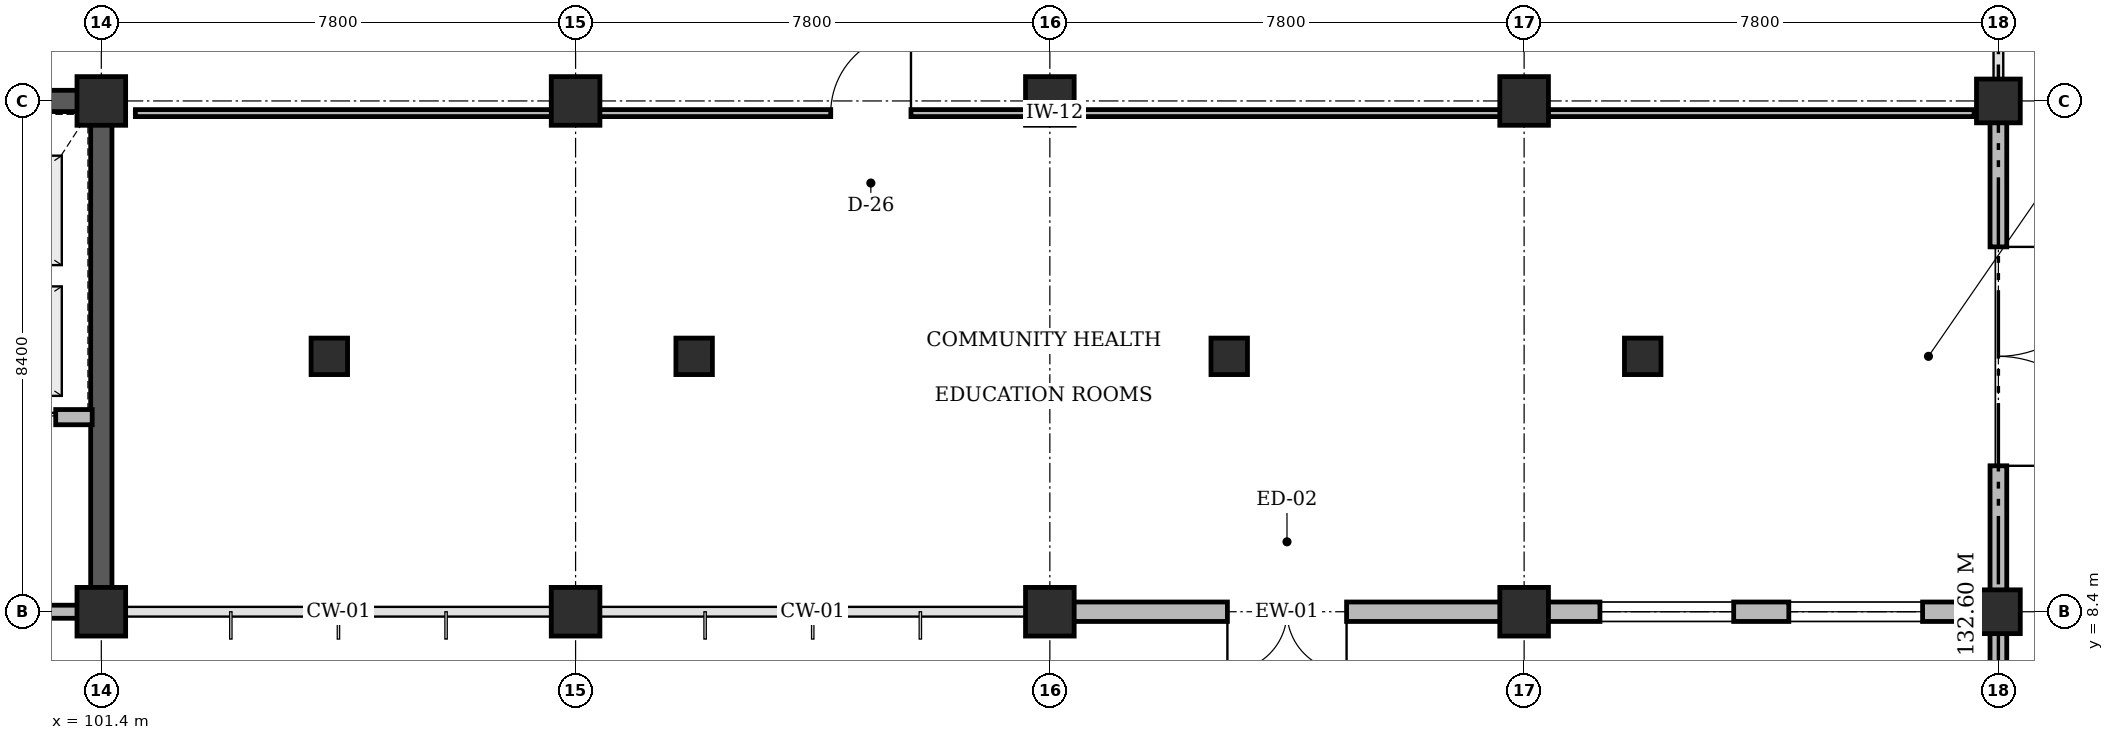
"""IFC4 building model, lengths in metres.
Left out: names, types, materials, properties, quantities, classifications, styles, units other than length and angle.
Written with IfcOpenShell. Run it as: python <this file> out.ifc"""

import sys

from ifc_helpers import new_model, si_unit, direction, frame, frame_2d, origin, origin_2d, place, context, subcontext, project, spatial, rectangle, circle, extrude, element, fill, save


model = new_model("IFC4")
c1 = context("Model", 3, precision=1e-05, world=origin(), true_north=direction((0.0, 1.0)))
c2 = subcontext(c1, "Body", "Model", "MODEL_VIEW")
j1 = project(units=[si_unit("LENGTHUNIT", "METRE"), si_unit("PLANEANGLEUNIT", "RADIAN")], contexts=[c1])
p1 = place(None, origin())
s1 = spatial("IfcSite", under=j1, at=p1, CompositionType="ELEMENT")
p2 = place(p1, origin())
s2 = spatial("IfcBuilding", under=s1, at=p2, CompositionType="ELEMENT")
p3 = place(p2, origin())
s3 = spatial("IfcBuildingStorey", under=s2, at=p3, CompositionType="ELEMENT", Elevation=0.0)
p4 = place(p3, frame((93.425, 16.8, 0.0), z_axis=(0.0, 0.0, 1.0), x_axis=(1.0, 0.0, 0.0)))
e1 = element("IfcWall", 1, at=p4, inside=s3, PredefinedType="SHEAR", context=c2, shape_type="SweptSolid", body=[
    extrude(rectangle(XDim=8.15, YDim=0.35, at=frame_2d((4.075, 0.0))), origin(), (0.0, 0.0, 1.0), 4.48),
])
p5 = place(p3, frame((101.4, 8.4, 0.0), z_axis=(0.0, 0.0, 1.0), x_axis=(0.0, 1.0, 0.0)))
e2 = element("IfcWall", 2, at=p5, inside=s3, PredefinedType="SHEAR", context=c2, shape_type="SweptSolid", body=[
    extrude(rectangle(XDim=8.4, YDim=0.35, at=frame_2d((4.2, 0.0))), origin(), (0.0, 0.0, 1.0), 4.48),
])
for number, where, z_axis, x_axis in (
    (3, (101.4, 8.4, 0.0), (0.0, 0.0, 1.0), (1.0, 0.0, 0.0)),
    (4, (101.4, 16.8, 0.0), (0.0, 0.0, 1.0), (1.0, 0.0, 0.0)),
    (5, (109.2, 8.4, 0.0), (0.0, 0.0, 1.0), (1.0, 0.0, 0.0)),
    (6, (109.2, 16.8, 0.0), (0.0, 0.0, 1.0), (1.0, 0.0, 0.0)),
    (7, (117.0, 8.4, 0.0), (0.0, 0.0, 1.0), (1.0, 0.0, 0.0)),
    (8, (117.0, 16.8, 0.0), (0.0, 0.0, 1.0), (1.0, 0.0, 0.0)),
    (9, (124.8, 8.4, 0.0), (0.0, 0.0, 1.0), (1.0, 0.0, 0.0)),
    (10, (124.8, 16.8, 0.0), (0.0, 0.0, 1.0), (1.0, 0.0, 0.0)),
):
    element("IfcColumn", number, at=place(p3, frame(where, z_axis=z_axis, x_axis=x_axis)), inside=s3, PredefinedType="COLUMN", context=c2, shape_type="SweptSolid", body=[
        extrude(rectangle(XDim=0.8, YDim=0.8, at=origin_2d()), origin(), (0.0, 0.0, 1.0), 4.8),
    ])
for number, where, z_axis, x_axis in (
    (11, (132.6, 8.4, 0.0), (0.0, 0.0, 1.0), (1.0, 0.0, 0.0)),
    (12, (132.6, 16.8, 0.0), (0.0, 0.0, 1.0), (1.0, 0.0, 0.0)),
):
    element("IfcColumn", number, at=place(p3, frame(where, z_axis=z_axis, x_axis=x_axis)), inside=s3, PredefinedType="COLUMN", context=c2, shape_type="SweptSolid", body=[
        extrude(rectangle(XDim=0.72, YDim=0.72, at=origin_2d()), origin(), (0.0, 0.0, 1.0), 4.8),
    ])
for number, where, z_axis, x_axis in (
    (13, (126.75, 12.6, 0.0), (0.0, 0.0, 1.0), (1.0, 0.0, 0.0)),
    (14, (119.95, 12.6, 0.0), (0.0, 0.0, 1.0), (1.0, 0.0, 0.0)),
    (15, (111.15, 12.6, 0.0), (0.0, 0.0, 1.0), (1.0, 0.0, 0.0)),
    (16, (105.15, 12.6, 0.0), (0.0, 0.0, 1.0), (1.0, 0.0, 0.0)),
):
    element("IfcColumn", number, at=place(p3, frame(where, z_axis=z_axis, x_axis=x_axis)), inside=s3, PredefinedType="PILASTER", context=c2, shape_type="SweptSolid", body=[
        extrude(circle(Radius=0.3, at=origin_2d()), origin(), (0.0, 0.0, 1.0), 4.8),
    ])
p6 = place(p3, frame((124.46, 8.4, 0.0), z_axis=(0.0, 0.0, 1.0), x_axis=(-1.0, 0.0, 0.0)))
e17 = element("IfcWall", 17, at=p6, inside=s3, PredefinedType="STANDARD", context=c2, shape_type="SweptSolid", body=[
    extrude(rectangle(XDim=7.12, YDim=0.32, at=frame_2d((3.56, 0.0))), origin(), (0.0, 0.0, 1.0), 3.63),
])
p7 = place(p6, frame((2.58, 0.0, 0.0)))
e18 = element("IfcOpeningElement", 18, at=p7, cuts=e17, PredefinedType="OPENING", context=c2, shape_type="SweptSolid", body=[
    extrude(rectangle(XDim=1.96, YDim=2.2, at=frame_2d((0.98, 1.1))), frame((0.0, 0.17, 0.0), z_axis=(0.0, -1.0, 0.0), x_axis=(1.0, 0.0, 0.0)), (0.0, 0.0, 1.0), 0.34),
])
p8 = place(p3, frame((132.26, 8.4, 0.0), z_axis=(0.0, 0.0, 1.0), x_axis=(-1.0, 0.0, 0.0)))
e19 = element("IfcWall", 19, at=p8, inside=s3, PredefinedType="STANDARD", context=c2, shape_type="SweptSolid", body=[
    extrude(rectangle(XDim=7.12, YDim=0.32, at=frame_2d((3.56, 0.0))), origin(), (0.0, 0.0, 1.0), 3.63),
])
p9 = place(p8, frame((0.907, 0.0, 0.9)))
e20 = element("IfcOpeningElement", 20, at=p9, cuts=e19, PredefinedType="OPENING", context=c2, shape_type="SweptSolid", body=[
    extrude(rectangle(XDim=2.2, YDim=1.65, at=frame_2d((1.1, 0.825))), frame((0.0, 0.17, 0.0), z_axis=(0.0, -1.0, 0.0), x_axis=(1.0, 0.0, 0.0)), (0.0, 0.0, 1.0), 0.34),
])
p10 = place(p8, frame((4.013, 0.0, 0.9)))
e21 = element("IfcOpeningElement", 21, at=p10, cuts=e19, PredefinedType="OPENING", context=c2, shape_type="SweptSolid", body=[
    extrude(rectangle(XDim=2.2, YDim=1.65, at=frame_2d((1.1, 0.825))), frame((0.0, 0.17, 0.0), z_axis=(0.0, -1.0, 0.0), x_axis=(1.0, 0.0, 0.0)), (0.0, 0.0, 1.0), 0.34),
])
p11 = place(p3, frame((132.6, 8.06, 0.0), z_axis=(0.0, 0.0, 1.0), x_axis=(0.0, -1.0, 0.0)))
e22 = element("IfcWall", 22, at=p11, inside=s3, PredefinedType="STANDARD", context=c2, shape_type="SweptSolid", body=[
    extrude(rectangle(XDim=7.72, YDim=0.275, at=frame_2d((3.86, 0.0))), origin(), (0.0, 0.0, 1.0), 3.615),
])
p12 = place(p11, frame((1.373, 0.0, 0.9)))
e23 = element("IfcOpeningElement", 23, at=p12, cuts=e22, PredefinedType="OPENING", context=c2, shape_type="SweptSolid", body=[
    extrude(rectangle(XDim=1.8, YDim=1.65, at=frame_2d((0.9, 0.825))), frame((0.0, 0.147, 0.0), z_axis=(0.0, -1.0, 0.0), x_axis=(1.0, 0.0, 0.0)), (0.0, 0.0, 1.0), 0.295),
])
p13 = place(p11, frame((4.547, 0.0, 0.9)))
e24 = element("IfcOpeningElement", 24, at=p13, cuts=e22, PredefinedType="OPENING", context=c2, shape_type="SweptSolid", body=[
    extrude(rectangle(XDim=1.8, YDim=1.65, at=frame_2d((0.9, 0.825))), frame((0.0, 0.147, 0.0), z_axis=(0.0, -1.0, 0.0), x_axis=(1.0, 0.0, 0.0)), (0.0, 0.0, 1.0), 0.295),
])
p14 = place(p3, frame((132.6, 16.46, 0.0), z_axis=(0.0, 0.0, 1.0), x_axis=(0.0, -1.0, 0.0)))
e25 = element("IfcWall", 25, at=p14, inside=s3, PredefinedType="STANDARD", context=c2, shape_type="SweptSolid", body=[
    extrude(rectangle(XDim=7.72, YDim=0.275, at=frame_2d((3.86, 0.0))), origin(), (0.0, 0.0, 1.0), 3.615),
])
p15 = place(p14, frame((2.06, 0.0, 0.0)))
e26 = element("IfcOpeningElement", 26, at=p15, cuts=e25, PredefinedType="OPENING", context=c2, shape_type="SweptSolid", body=[
    extrude(rectangle(XDim=3.6, YDim=2.8, at=frame_2d((1.8, 1.4))), frame((0.0, 0.147, 0.0), z_axis=(0.0, -1.0, 0.0), x_axis=(1.0, 0.0, 0.0)), (0.0, 0.0, 1.0), 0.295),
])
p16 = place(p3, frame((97.75, 8.4, 0.0), z_axis=(0.0, 0.0, 1.0), x_axis=(1.0, 0.0, 0.0)))
e27 = element("IfcWall", 27, at=p16, inside=s3, PredefinedType="STANDARD", context=c2, shape_type="SweptSolid", body=[
    extrude(rectangle(XDim=3.29, YDim=0.215, at=frame_2d((1.645, 0.0))), origin(), (0.0, 0.0, 1.0), 3.63),
])
p17 = place(p16, frame((0.865, 0.0, 0.0)))
e28 = element("IfcOpeningElement", 28, at=p17, cuts=e27, PredefinedType="OPENING", context=c2, shape_type="SweptSolid", body=[
    extrude(rectangle(XDim=1.56, YDim=2.2, at=frame_2d((0.78, 1.1))), frame((0.0, 0.118, 0.0), z_axis=(0.0, -1.0, 0.0), x_axis=(1.0, 0.0, 0.0)), (0.0, 0.0, 1.0), 0.235),
])
p18 = place(p3, frame((97.75, 11.6, 0.0), z_axis=(0.0, 0.0, 1.0), x_axis=(1.0, 0.0, 0.0)))
e29 = element("IfcWall", 29, at=p18, inside=s3, PredefinedType="STANDARD", context=c2, shape_type="SweptSolid", body=[
    extrude(rectangle(XDim=3.5, YDim=0.25, at=frame_2d((1.75, 0.0))), origin(), (0.0, 0.0, 1.0), 4.46),
])
p19 = place(p18, frame((0.35, 0.0, 0.0)))
e30 = element("IfcOpeningElement", 30, at=p19, cuts=e29, PredefinedType="OPENING", context=c2, shape_type="SweptSolid", body=[
    extrude(rectangle(XDim=1.1, YDim=2.2, at=frame_2d((0.55, 1.1))), frame((0.0, 0.135, 0.0), z_axis=(0.0, -1.0, 0.0), x_axis=(1.0, 0.0, 0.0)), (0.0, 0.0, 1.0), 0.27),
])
p20 = place(p18, frame((1.8, 0.0, 0.0)))
e31 = element("IfcOpeningElement", 31, at=p20, cuts=e29, PredefinedType="OPENING", context=c2, shape_type="SweptSolid", body=[
    extrude(rectangle(XDim=1.1, YDim=2.2, at=frame_2d((0.55, 1.1))), frame((0.0, 0.135, 0.0), z_axis=(0.0, -1.0, 0.0), x_axis=(1.0, 0.0, 0.0)), (0.0, 0.0, 1.0), 0.27),
])
p21 = place(p3, frame((101.96, 16.6, 0.0), z_axis=(0.0, 0.0, 1.0), x_axis=(1.0, 0.0, 0.0)))
e32 = element("IfcWall", 32, at=p21, inside=s3, PredefinedType="PARTITIONING", context=c2, shape_type="SweptSolid", body=[
    extrude(rectangle(XDim=30.24, YDim=0.115, at=frame_2d((15.12, 0.0))), origin(), (0.0, 0.0, 1.0), 3.63),
])
p22 = place(p21, frame((11.436, 0.0, 0.0)))
e33 = element("IfcOpeningElement", 33, at=p22, cuts=e32, PredefinedType="OPENING", context=c2, shape_type="SweptSolid", body=[
    extrude(rectangle(XDim=1.32, YDim=2.15, at=frame_2d((0.66, 1.075))), frame((0.0, 0.067, 0.0), z_axis=(0.0, -1.0, 0.0), x_axis=(1.0, 0.0, 0.0)), (0.0, 0.0, 1.0), 0.135),
])
p23 = place(p7, origin())
e34 = element("IfcDoor", 34, at=p23, inside=s3, OperationType="DOUBLE_DOOR_SINGLE_SWING", PredefinedType="DOOR", context=c2, shape_type="SweptSolid", body=[
    extrude(rectangle(XDim=1.96, YDim=2.2, at=frame_2d((0.98, 1.1))), frame((0.0, 0.025, 0.0), z_axis=(0.0, -1.0, 0.0), x_axis=(1.0, 0.0, 0.0)), (0.0, 0.0, 1.0), 0.05),
])
fill(e18, e34)
p24 = place(p9, origin())
e35 = element("IfcWindow", 35, at=p24, inside=s3, PartitioningType="SINGLE_PANEL", PredefinedType="WINDOW", context=c2, shape_type="SweptSolid", body=[
    extrude(rectangle(XDim=2.2, YDim=1.65, at=frame_2d((1.1, 0.825))), frame((0.0, 0.03, 0.0), z_axis=(0.0, -1.0, 0.0), x_axis=(1.0, 0.0, 0.0)), (0.0, 0.0, 1.0), 0.06),
])
fill(e20, e35)
p25 = place(p10, origin())
e36 = element("IfcWindow", 36, at=p25, inside=s3, PartitioningType="SINGLE_PANEL", PredefinedType="WINDOW", context=c2, shape_type="SweptSolid", body=[
    extrude(rectangle(XDim=2.2, YDim=1.65, at=frame_2d((1.1, 0.825))), frame((0.0, 0.03, 0.0), z_axis=(0.0, -1.0, 0.0), x_axis=(1.0, 0.0, 0.0)), (0.0, 0.0, 1.0), 0.06),
])
fill(e21, e36)
p26 = place(p15, origin())
e37 = element("IfcDoor", 37, at=p26, inside=s3, OperationType="DOUBLE_DOOR_SINGLE_SWING", PredefinedType="GATE", context=c2, shape_type="SweptSolid", body=[
    extrude(rectangle(XDim=3.6, YDim=2.8, at=frame_2d((1.8, 1.4))), frame((0.0, 0.025, 0.0), z_axis=(0.0, -1.0, 0.0), x_axis=(1.0, 0.0, 0.0)), (0.0, 0.0, 1.0), 0.05),
])
fill(e26, e37)
p27 = place(p20, origin())
e38 = element("IfcDoor", 38, at=p27, inside=s3, OperationType="SLIDING_TO_LEFT", PredefinedType="DOOR", context=c2, shape_type="SweptSolid", body=[
    extrude(rectangle(XDim=1.1, YDim=2.2, at=frame_2d((0.55, 1.1))), frame((0.0, 0.025, 0.0), z_axis=(0.0, -1.0, 0.0), x_axis=(1.0, 0.0, 0.0)), (0.0, 0.0, 1.0), 0.05),
])
fill(e31, e38)
p28 = place(p22, origin())
e39 = element("IfcDoor", 39, at=p28, inside=s3, OperationType="SINGLE_SWING_RIGHT", PredefinedType="DOOR", context=c2, shape_type="SweptSolid", body=[
    extrude(rectangle(XDim=1.32, YDim=2.15, at=frame_2d((0.66, 1.075))), frame((0.0, 0.025, 0.0), z_axis=(0.0, -1.0, 0.0), x_axis=(1.0, 0.0, 0.0)), (0.0, 0.0, 1.0), 0.05),
])
fill(e33, e39)
save(model, sys.argv[1])
